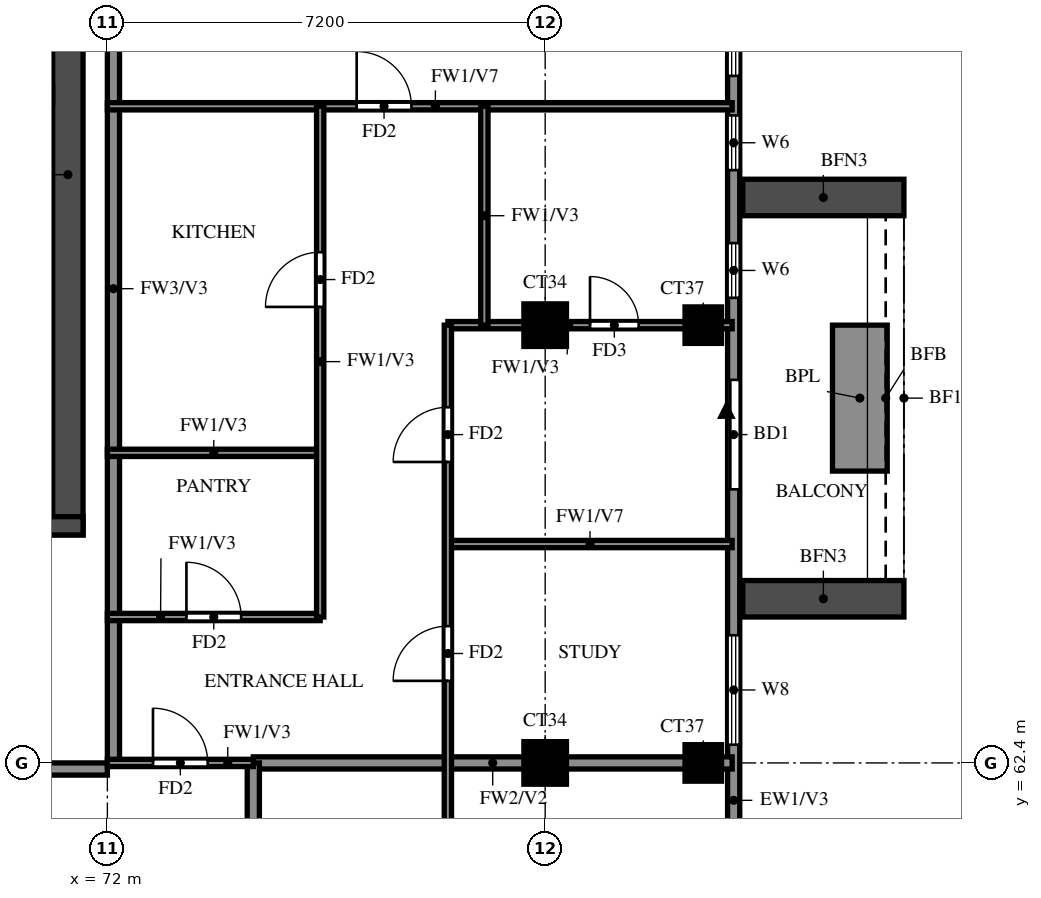
"""IFC4 building model, lengths in metres.
Left out: names, types, materials, properties, quantities, classifications, styles, units other than length and angle.
Written with IfcOpenShell. Run it as: python <this file> out.ifc"""

import sys

from ifc_helpers import new_model, si_unit, direction, frame, frame_2d, origin, origin_2d, place, context, subcontext, project, spatial, rectangle, extrude, source, transform, mapped, element, fill, save


model = new_model("IFC4")
c1 = context("Model", 3, precision=1e-05, world=origin(), true_north=direction((0.0, 1.0)))
c2 = subcontext(c1, "Body", "Model", "MODEL_VIEW")
j1 = project(units=[si_unit("LENGTHUNIT", "METRE"), si_unit("PLANEANGLEUNIT", "RADIAN")], contexts=[c1])
p1 = place(None, origin())
s1 = spatial("IfcSite", under=j1, at=p1, CompositionType="ELEMENT")
p2 = place(p1, origin())
s2 = spatial("IfcBuilding", under=s1, at=p2, CompositionType="ELEMENT")
p3 = place(p2, frame((0.0, 0.0, 253.5)))
s3 = spatial("IfcBuildingStorey", under=s2, at=p3, CompositionType="ELEMENT", Elevation=253.5)
m1 = source(origin(), c2, "Body", "SweptSolid", [
    extrude(rectangle(XDim=0.7, YDim=0.7, at=origin_2d()), origin(), (0.0, 0.0, 1.0), 3.22),
])
p4 = place(p3, frame((79.2, 62.4, 0.0), z_axis=(0.0, 0.0, 1.0), x_axis=(1.0, 0.0, 0.0)))
e1 = element("IfcColumn", 1, at=p4, inside=s3, PredefinedType="COLUMN", context=c2, shape_type="MappedRepresentation", body=[
    mapped(m1, transform((0.0, 0.0, 0.0))),
])
m2 = source(origin(), c2, "Body", "SweptSolid", [
    extrude(rectangle(XDim=0.6, YDim=0.6, at=origin_2d()), origin(), (0.0, 0.0, 1.0), 3.22),
])
p5 = place(p3, frame((81.8, 62.4, 0.0), z_axis=(0.0, 0.0, 1.0), x_axis=(1.0, 0.0, 0.0)))
e2 = element("IfcColumn", 2, at=p5, inside=s3, PredefinedType="COLUMN", context=c2, shape_type="MappedRepresentation", body=[
    mapped(m2, transform((0.0, 0.0, 0.0))),
])
p6 = place(p3, frame((79.2, 69.6, 0.0), z_axis=(0.0, 0.0, 1.0), x_axis=(1.0, 0.0, 0.0)))
e3 = element("IfcColumn", 3, at=p6, inside=s3, PredefinedType="COLUMN", context=c2, shape_type="MappedRepresentation", body=[
    mapped(m1, transform((0.0, 0.0, 0.0))),
])
p7 = place(p3, frame((81.8, 69.6, 0.0), z_axis=(0.0, 0.0, 1.0), x_axis=(1.0, 0.0, 0.0)))
e4 = element("IfcColumn", 4, at=p7, inside=s3, PredefinedType="COLUMN", context=c2, shape_type="MappedRepresentation", body=[
    mapped(m2, transform((0.0, 0.0, 0.0))),
])
p8 = place(p3, frame((71.35, 66.15, 0.0), z_axis=(0.0, 0.0, 1.0), x_axis=(0.0, 1.0, 0.0)))
e5 = element("IfcWall", 5, at=p8, inside=s3, PredefinedType="SHEAR", context=c2, shape_type="SweptSolid", body=[
    extrude(rectangle(XDim=11.85, YDim=0.5, at=frame_2d((5.925, 0.0))), origin(), (0.0, 0.0, 1.0), 3.22),
])
p9 = place(p3, frame((29.2, 66.3, 0.0), z_axis=(0.0, 0.0, 1.0), x_axis=(1.0, 0.0, 0.0)))
e6 = element("IfcWall", 6, at=p9, inside=s3, PredefinedType="SHEAR", context=c2, shape_type="SweptSolid", body=[
    extrude(rectangle(XDim=42.4, YDim=0.3, at=frame_2d((21.2, 0.0))), origin(), (0.0, 0.0, 1.0), 3.22),
])
p10 = place(p9, frame((1.425, 0.0, 0.0)))
e7 = element("IfcOpeningElement", 7, at=p10, cuts=e6, PredefinedType="OPENING", context=c2, shape_type="SweptSolid", body=[
    extrude(rectangle(XDim=1.1, YDim=2.1, at=frame_2d((0.55, 1.05))), frame((0.0, 0.16, 0.0), z_axis=(0.0, -1.0, 0.0), x_axis=(1.0, 0.0, 0.0)), (0.0, 0.0, 1.0), 0.32),
])
p11 = place(p9, frame((4.2, 0.0, 0.0)))
e8 = element("IfcOpeningElement", 8, at=p11, cuts=e6, PredefinedType="OPENING", context=c2, shape_type="SweptSolid", body=[
    extrude(rectangle(XDim=1.8, YDim=2.1, at=frame_2d((0.9, 1.05))), frame((0.0, 0.16, 0.0), z_axis=(0.0, -1.0, 0.0), x_axis=(1.0, 0.0, 0.0)), (0.0, 0.0, 1.0), 0.32),
])
p12 = place(p3, frame((82.3, 48.2, 0.0), z_axis=(0.0, 0.0, 1.0), x_axis=(0.0, 1.0, 0.0)))
e9 = element("IfcWall", 9, at=p12, inside=s3, PredefinedType="SOLIDWALL", context=c2, shape_type="SweptSolid", body=[
    extrude(rectangle(XDim=28.6, YDim=0.2, at=frame_2d((14.3, 0.0))), origin(), (0.0, 0.0, 1.0), 3.22),
])
p13 = place(p12, frame((4.3, 0.0, 0.0)))
e10 = element("IfcOpeningElement", 10, at=p13, cuts=e9, PredefinedType="OPENING", context=c2, shape_type="SweptSolid", body=[
    extrude(rectangle(XDim=1.8, YDim=2.4, at=frame_2d((0.9, 1.2))), frame((0.0, 0.11, 0.0), z_axis=(0.0, -1.0, 0.0), x_axis=(1.0, 0.0, 0.0)), (0.0, 0.0, 1.0), 0.22),
])
p14 = place(p12, frame((18.7, 0.0, 0.0)))
e11 = element("IfcOpeningElement", 11, at=p14, cuts=e9, PredefinedType="OPENING", context=c2, shape_type="SweptSolid", body=[
    extrude(rectangle(XDim=1.8, YDim=2.4, at=frame_2d((0.9, 1.2))), frame((0.0, 0.11, 0.0), z_axis=(0.0, -1.0, 0.0), x_axis=(1.0, 0.0, 0.0)), (0.0, 0.0, 1.0), 0.22),
])
p15 = place(p12, frame((0.6, 0.0, 0.6)))
e12 = element("IfcOpeningElement", 12, at=p15, cuts=e9, PredefinedType="OPENING", context=c2, shape_type="SweptSolid", body=[
    extrude(rectangle(XDim=1.2, YDim=2.4, at=frame_2d((0.6, 1.2))), frame((0.0, 0.11, 0.0), z_axis=(0.0, -1.0, 0.0), x_axis=(1.0, 0.0, 0.0)), (0.0, 0.0, 1.0), 0.22),
])
p16 = place(p12, frame((7.3, 0.0, 0.6)))
e13 = element("IfcOpeningElement", 13, at=p16, cuts=e9, PredefinedType="OPENING", context=c2, shape_type="SweptSolid", body=[
    extrude(rectangle(XDim=1.2, YDim=2.4, at=frame_2d((0.6, 1.2))), frame((0.0, 0.11, 0.0), z_axis=(0.0, -1.0, 0.0), x_axis=(1.0, 0.0, 0.0)), (0.0, 0.0, 1.0), 0.22),
])
p17 = place(p12, frame((10.6, 0.0, 0.6)))
e14 = element("IfcOpeningElement", 14, at=p17, cuts=e9, PredefinedType="OPENING", context=c2, shape_type="SweptSolid", body=[
    extrude(rectangle(XDim=2.4, YDim=2.4, at=frame_2d((1.2, 1.2))), frame((0.0, 0.11, 0.0), z_axis=(0.0, -1.0, 0.0), x_axis=(1.0, 0.0, 0.0)), (0.0, 0.0, 1.0), 0.22),
])
p18 = place(p12, frame((14.5, 0.0, 0.6)))
e15 = element("IfcOpeningElement", 15, at=p18, cuts=e9, PredefinedType="OPENING", context=c2, shape_type="SweptSolid", body=[
    extrude(rectangle(XDim=1.8, YDim=2.4, at=frame_2d((0.9, 1.2))), frame((0.0, 0.11, 0.0), z_axis=(0.0, -1.0, 0.0), x_axis=(1.0, 0.0, 0.0)), (0.0, 0.0, 1.0), 0.22),
])
p19 = place(p12, frame((21.85, 0.0, 1.5)))
e16 = element("IfcOpeningElement", 16, at=p19, cuts=e9, PredefinedType="OPENING", context=c2, shape_type="SweptSolid", body=[
    extrude(rectangle(XDim=0.9, YDim=0.9, at=frame_2d((0.45, 0.45))), frame((0.0, 0.11, 0.0), z_axis=(0.0, -1.0, 0.0), x_axis=(1.0, 0.0, 0.0)), (0.0, 0.0, 1.0), 0.22),
])
p20 = place(p12, frame((23.95, 0.0, 1.5)))
e17 = element("IfcOpeningElement", 17, at=p20, cuts=e9, PredefinedType="OPENING", context=c2, shape_type="SweptSolid", body=[
    extrude(rectangle(XDim=0.9, YDim=0.9, at=frame_2d((0.45, 0.45))), frame((0.0, 0.11, 0.0), z_axis=(0.0, -1.0, 0.0), x_axis=(1.0, 0.0, 0.0)), (0.0, 0.0, 1.0), 0.22),
])
p21 = place(p12, frame((25.5, 0.0, 0.6)))
e18 = element("IfcOpeningElement", 18, at=p21, cuts=e9, PredefinedType="OPENING", context=c2, shape_type="SweptSolid", body=[
    extrude(rectangle(XDim=2.4, YDim=2.4, at=frame_2d((1.2, 1.2))), frame((0.0, 0.11, 0.0), z_axis=(0.0, -1.0, 0.0), x_axis=(1.0, 0.0, 0.0)), (0.0, 0.0, 1.0), 0.22),
])
for number, where, z_axis, x_axis in (
    (19, (82.45, 65.1, 0.0), (0.0, 0.0, 1.0), (1.0, 0.0, 0.0)),
    (20, (82.45, 71.7, 0.0), (0.0, 0.0, 1.0), (1.0, 0.0, 0.0)),
):
    element("IfcWall", number, at=place(p3, frame(where, z_axis=z_axis, x_axis=x_axis)), inside=s3, PredefinedType="SOLIDWALL", context=c2, shape_type="SweptSolid", body=[
        extrude(rectangle(XDim=2.65, YDim=0.6, at=frame_2d((1.325, 0.0))), origin(), (0.0, 0.0, 1.0), 2.85),
    ])
p22 = place(p3, frame((84.375, 67.2, 0.0), z_axis=(0.0, 0.0, 1.0), x_axis=(0.0, 1.0, 0.0)))
e21 = element("IfcWall", 21, at=p22, inside=s3, PredefinedType="SOLIDWALL", context=c2, shape_type="SweptSolid", body=[
    extrude(rectangle(XDim=2.4, YDim=0.9, at=frame_2d((1.2, 0.0))), origin(), (0.0, 0.0, 1.0), 0.9),
])
p23 = place(p3, frame((67.2, 62.3, 0.0), z_axis=(0.0, 0.0, 1.0), x_axis=(1.0, 0.0, 0.0)))
e22 = element("IfcWall", 22, at=p23, inside=s3, PredefinedType="SOLIDWALL", context=c2, shape_type="SweptSolid", body=[
    extrude(rectangle(XDim=4.8, YDim=0.2, at=frame_2d((2.4, 0.0))), origin(), (0.0, 0.0, 1.0), 3.22),
])
p24 = place(p3, frame((72.1, 62.4, 0.0), z_axis=(0.0, 0.0, 1.0), x_axis=(0.0, 1.0, 0.0)))
e23 = element("IfcWall", 23, at=p24, inside=s3, PredefinedType="SOLIDWALL", context=c2, shape_type="SweptSolid", body=[
    extrude(rectangle(XDim=15.6, YDim=0.2, at=frame_2d((7.8, 0.0))), origin(), (0.0, 0.0, 1.0), 3.22),
])
p25 = place(p3, frame((74.4, 62.4, 0.0), z_axis=(0.0, 0.0, 1.0), x_axis=(1.0, 0.0, 0.0)))
e24 = element("IfcWall", 24, at=p25, inside=s3, PredefinedType="SOLIDWALL", context=c2, shape_type="SweptSolid", body=[
    extrude(rectangle(XDim=7.875, YDim=0.2, at=frame_2d((3.938, 0.0))), origin(), (0.0, 0.0, 1.0), 3.22),
])
p26 = place(p3, frame((74.4, 60.0, 0.0), z_axis=(0.0, 0.0, 1.0), x_axis=(0.0, 1.0, 0.0)))
e25 = element("IfcWall", 25, at=p26, inside=s3, PredefinedType="SOLIDWALL", context=c2, shape_type="SweptSolid", body=[
    extrude(rectangle(XDim=2.4, YDim=0.2, at=frame_2d((1.2, 0.0))), origin(), (0.0, 0.0, 1.0), 3.22),
])
p27 = place(p3, frame((72.0, 62.4, 0.0), z_axis=(0.0, 0.0, 1.0), x_axis=(1.0, 0.0, 0.0)))
e26 = element("IfcWall", 26, at=p27, inside=s3, PredefinedType="PARTITIONING", context=c2, shape_type="SweptSolid", body=[
    extrude(rectangle(XDim=2.4, YDim=0.12, at=frame_2d((1.2, 0.0))), origin(), (0.0, 0.0, 1.0), 3.22),
])
p28 = place(p27, frame((0.75, 0.0, 0.0)))
e27 = element("IfcOpeningElement", 27, at=p28, cuts=e26, PredefinedType="OPENING", context=c2, shape_type="SweptSolid", body=[
    extrude(rectangle(XDim=0.9, YDim=2.1, at=frame_2d((0.45, 1.05))), frame((0.0, 0.07, 0.0), z_axis=(0.0, -1.0, 0.0), x_axis=(1.0, 0.0, 0.0)), (0.0, 0.0, 1.0), 0.14),
])
p29 = place(p3, frame((72.0, 64.8, 0.0), z_axis=(0.0, 0.0, 1.0), x_axis=(1.0, 0.0, 0.0)))
e28 = element("IfcWall", 28, at=p29, inside=s3, PredefinedType="PARTITIONING", context=c2, shape_type="SweptSolid", body=[
    extrude(rectangle(XDim=3.5, YDim=0.12, at=frame_2d((1.75, 0.0))), origin(), (0.0, 0.0, 1.0), 3.22),
])
p30 = place(p29, frame((1.3, 0.0, 0.0)))
e29 = element("IfcOpeningElement", 29, at=p30, cuts=e28, PredefinedType="OPENING", context=c2, shape_type="SweptSolid", body=[
    extrude(rectangle(XDim=0.9, YDim=2.1, at=frame_2d((0.45, 1.05))), frame((0.0, 0.07, 0.0), z_axis=(0.0, -1.0, 0.0), x_axis=(1.0, 0.0, 0.0)), (0.0, 0.0, 1.0), 0.14),
])
p31 = place(p3, frame((77.6, 66.0, 0.0), z_axis=(0.0, 0.0, 1.0), x_axis=(1.0, 0.0, 0.0)))
e30 = element("IfcWall", 30, at=p31, inside=s3, PredefinedType="PARTITIONING", context=c2, shape_type="SweptSolid", body=[
    extrude(rectangle(XDim=4.675, YDim=0.12, at=frame_2d((2.337, 0.0))), origin(), (0.0, 0.0, 1.0), 2.32),
])
p32 = place(p3, frame((72.0, 67.5, 0.0), z_axis=(0.0, 0.0, 1.0), x_axis=(1.0, 0.0, 0.0)))
e31 = element("IfcWall", 31, at=p32, inside=s3, PredefinedType="PARTITIONING", context=c2, shape_type="SweptSolid", body=[
    extrude(rectangle(XDim=3.5, YDim=0.12, at=frame_2d((1.75, 0.0))), origin(), (0.0, 0.0, 1.0), 3.22),
])
p33 = place(p3, frame((77.6, 69.6, 0.0), z_axis=(0.0, 0.0, 1.0), x_axis=(1.0, 0.0, 0.0)))
e32 = element("IfcWall", 32, at=p33, inside=s3, PredefinedType="PARTITIONING", context=c2, shape_type="SweptSolid", body=[
    extrude(rectangle(XDim=4.675, YDim=0.12, at=frame_2d((2.337, 0.0))), origin(), (0.0, 0.0, 1.0), 3.22),
])
p34 = place(p33, frame((2.337, 0.0, 0.0)))
e33 = element("IfcOpeningElement", 33, at=p34, cuts=e32, PredefinedType="OPENING", context=c2, shape_type="SweptSolid", body=[
    extrude(rectangle(XDim=0.8, YDim=2.1, at=frame_2d((0.4, 1.05))), frame((0.0, 0.07, 0.0), z_axis=(0.0, -1.0, 0.0), x_axis=(1.0, 0.0, 0.0)), (0.0, 0.0, 1.0), 0.14),
])
p35 = place(p3, frame((72.0, 73.2, 0.0), z_axis=(0.0, 0.0, 1.0), x_axis=(1.0, 0.0, 0.0)))
e34 = element("IfcWall", 34, at=p35, inside=s3, PredefinedType="PARTITIONING", context=c2, shape_type="SweptSolid", body=[
    extrude(rectangle(XDim=10.275, YDim=0.12, at=frame_2d((5.137, 0.0))), origin(), (0.0, 0.0, 1.0), 2.32),
])
p36 = place(p35, frame((4.1, 0.0, 0.0)))
e35 = element("IfcOpeningElement", 35, at=p36, cuts=e34, PredefinedType="OPENING", context=c2, shape_type="SweptSolid", body=[
    extrude(rectangle(XDim=0.9, YDim=2.1, at=frame_2d((0.45, 1.05))), frame((0.0, 0.07, 0.0), z_axis=(0.0, -1.0, 0.0), x_axis=(1.0, 0.0, 0.0)), (0.0, 0.0, 1.0), 0.14),
])
p37 = place(p3, frame((75.5, 64.8, 0.0), z_axis=(0.0, 0.0, 1.0), x_axis=(0.0, 1.0, 0.0)))
e36 = element("IfcWall", 36, at=p37, inside=s3, PredefinedType="PARTITIONING", context=c2, shape_type="SweptSolid", body=[
    extrude(rectangle(XDim=8.4, YDim=0.12, at=frame_2d((4.2, 0.0))), origin(), (0.0, 0.0, 1.0), 3.22),
])
p38 = place(p37, frame((5.1, 0.0, 0.0)))
e37 = element("IfcOpeningElement", 37, at=p38, cuts=e36, PredefinedType="OPENING", context=c2, shape_type="SweptSolid", body=[
    extrude(rectangle(XDim=0.9, YDim=2.1, at=frame_2d((0.45, 1.05))), frame((0.0, 0.07, 0.0), z_axis=(0.0, -1.0, 0.0), x_axis=(1.0, 0.0, 0.0)), (0.0, 0.0, 1.0), 0.14),
])
p39 = place(p3, frame((77.6, 48.125, 0.0), z_axis=(0.0, 0.0, 1.0), x_axis=(0.0, 1.0, 0.0)))
e38 = element("IfcWall", 38, at=p39, inside=s3, PredefinedType="PARTITIONING", context=c2, shape_type="SweptSolid", body=[
    extrude(rectangle(XDim=21.475, YDim=0.12, at=frame_2d((10.738, 0.0))), origin(), (0.0, 0.0, 1.0), 3.22),
])
p40 = place(p39, frame((1.288, 0.0, 0.0)))
e39 = element("IfcOpeningElement", 39, at=p40, cuts=e38, PredefinedType="OPENING", context=c2, shape_type="SweptSolid", body=[
    extrude(rectangle(XDim=0.9, YDim=2.1, at=frame_2d((0.45, 1.05))), frame((0.0, 0.07, 0.0), z_axis=(0.0, -1.0, 0.0), x_axis=(1.0, 0.0, 0.0)), (0.0, 0.0, 1.0), 0.14),
])
p41 = place(p39, frame((4.825, 0.0, 0.0)))
e40 = element("IfcOpeningElement", 40, at=p41, cuts=e38, PredefinedType="OPENING", context=c2, shape_type="SweptSolid", body=[
    extrude(rectangle(XDim=0.9, YDim=2.1, at=frame_2d((0.45, 1.05))), frame((0.0, 0.07, 0.0), z_axis=(0.0, -1.0, 0.0), x_axis=(1.0, 0.0, 0.0)), (0.0, 0.0, 1.0), 0.14),
])
p42 = place(p39, frame((9.925, 0.0, 0.0)))
e41 = element("IfcOpeningElement", 41, at=p42, cuts=e38, PredefinedType="OPENING", context=c2, shape_type="SweptSolid", body=[
    extrude(rectangle(XDim=1.5, YDim=2.1, at=frame_2d((0.75, 1.05))), frame((0.0, 0.07, 0.0), z_axis=(0.0, -1.0, 0.0), x_axis=(1.0, 0.0, 0.0)), (0.0, 0.0, 1.0), 0.14),
])
p43 = place(p39, frame((15.625, 0.0, 0.0)))
e42 = element("IfcOpeningElement", 42, at=p43, cuts=e38, PredefinedType="OPENING", context=c2, shape_type="SweptSolid", body=[
    extrude(rectangle(XDim=0.9, YDim=2.1, at=frame_2d((0.45, 1.05))), frame((0.0, 0.07, 0.0), z_axis=(0.0, -1.0, 0.0), x_axis=(1.0, 0.0, 0.0)), (0.0, 0.0, 1.0), 0.14),
])
p44 = place(p39, frame((19.225, 0.0, 0.0)))
e43 = element("IfcOpeningElement", 43, at=p44, cuts=e38, PredefinedType="OPENING", context=c2, shape_type="SweptSolid", body=[
    extrude(rectangle(XDim=0.9, YDim=2.1, at=frame_2d((0.45, 1.05))), frame((0.0, 0.07, 0.0), z_axis=(0.0, -1.0, 0.0), x_axis=(1.0, 0.0, 0.0)), (0.0, 0.0, 1.0), 0.14),
])
p45 = place(p3, frame((78.2, 69.6, 0.0), z_axis=(0.0, 0.0, 1.0), x_axis=(0.0, 1.0, 0.0)))
e44 = element("IfcWall", 44, at=p45, inside=s3, PredefinedType="PARTITIONING", context=c2, shape_type="SweptSolid", body=[
    extrude(rectangle(XDim=3.6, YDim=0.12, at=frame_2d((1.8, 0.0))), origin(), (0.0, 0.0, 1.0), 3.22),
])
p46 = place(p14, origin())
e45 = element("IfcDoor", 45, at=p46, inside=s3, OperationType="DOUBLE_DOOR_SLIDING", PredefinedType="DOOR", context=c2, shape_type="SweptSolid", body=[
    extrude(rectangle(XDim=1.8, YDim=2.4, at=frame_2d((0.9, 1.2))), frame((0.0, 0.025, 0.0), z_axis=(0.0, -1.0, 0.0), x_axis=(1.0, 0.0, 0.0)), (0.0, 0.0, 1.0), 0.05),
])
fill(e11, e45)
p47 = place(p18, origin())
e46 = element("IfcWindow", 46, at=p47, inside=s3, PartitioningType="DOUBLE_PANEL_VERTICAL", PredefinedType="WINDOW", context=c2, shape_type="SweptSolid", body=[
    extrude(rectangle(XDim=1.8, YDim=2.4, at=frame_2d((0.9, 1.2))), frame((0.0, 0.03, 0.0), z_axis=(0.0, -1.0, 0.0), x_axis=(1.0, 0.0, 0.0)), (0.0, 0.0, 1.0), 0.06),
])
fill(e15, e46)
p48 = place(p19, origin())
e47 = element("IfcWindow", 47, at=p48, inside=s3, PartitioningType="SINGLE_PANEL", PredefinedType="WINDOW", context=c2, shape_type="SweptSolid", body=[
    extrude(rectangle(XDim=0.9, YDim=0.9, at=frame_2d((0.45, 0.45))), frame((0.0, 0.03, 0.0), z_axis=(0.0, -1.0, 0.0), x_axis=(1.0, 0.0, 0.0)), (0.0, 0.0, 1.0), 0.06),
])
fill(e16, e47)
p49 = place(p20, origin())
e48 = element("IfcWindow", 48, at=p49, inside=s3, PartitioningType="SINGLE_PANEL", PredefinedType="WINDOW", context=c2, shape_type="SweptSolid", body=[
    extrude(rectangle(XDim=0.9, YDim=0.9, at=frame_2d((0.45, 0.45))), frame((0.0, 0.03, 0.0), z_axis=(0.0, -1.0, 0.0), x_axis=(1.0, 0.0, 0.0)), (0.0, 0.0, 1.0), 0.06),
])
fill(e17, e48)
p50 = place(p21, origin())
e49 = element("IfcWindow", 49, at=p50, inside=s3, PartitioningType="DOUBLE_PANEL_VERTICAL", PredefinedType="WINDOW", context=c2, shape_type="SweptSolid", body=[
    extrude(rectangle(XDim=2.4, YDim=2.4, at=frame_2d((1.2, 1.2))), frame((0.0, 0.03, 0.0), z_axis=(0.0, -1.0, 0.0), x_axis=(1.0, 0.0, 0.0)), (0.0, 0.0, 1.0), 0.06),
])
fill(e18, e49)
p51 = place(p28, origin())
e50 = element("IfcDoor", 50, at=p51, inside=s3, OperationType="SINGLE_SWING_RIGHT", PredefinedType="DOOR", context=c2, shape_type="SweptSolid", body=[
    extrude(rectangle(XDim=0.9, YDim=2.1, at=frame_2d((0.45, 1.05))), frame((0.0, 0.025, 0.0), z_axis=(0.0, -1.0, 0.0), x_axis=(1.0, 0.0, 0.0)), (0.0, 0.0, 1.0), 0.05),
])
fill(e27, e50)
p52 = place(p43, origin())
e51 = element("IfcDoor", 51, at=p52, inside=s3, OperationType="SINGLE_SWING_LEFT", PredefinedType="DOOR", context=c2, shape_type="SweptSolid", body=[
    extrude(rectangle(XDim=0.9, YDim=2.1, at=frame_2d((0.45, 1.05))), frame((0.0, 0.025, 0.0), z_axis=(0.0, -1.0, 0.0), x_axis=(1.0, 0.0, 0.0)), (0.0, 0.0, 1.0), 0.05),
])
fill(e42, e51)
p53 = place(p44, origin())
e52 = element("IfcDoor", 52, at=p53, inside=s3, OperationType="SINGLE_SWING_RIGHT", PredefinedType="DOOR", context=c2, shape_type="SweptSolid", body=[
    extrude(rectangle(XDim=0.9, YDim=2.1, at=frame_2d((0.45, 1.05))), frame((0.0, 0.025, 0.0), z_axis=(0.0, -1.0, 0.0), x_axis=(1.0, 0.0, 0.0)), (0.0, 0.0, 1.0), 0.05),
])
fill(e43, e52)
p54 = place(p34, origin())
e53 = element("IfcDoor", 53, at=p54, inside=s3, OperationType="SINGLE_SWING_RIGHT", PredefinedType="DOOR", context=c2, shape_type="SweptSolid", body=[
    extrude(rectangle(XDim=0.8, YDim=2.1, at=frame_2d((0.4, 1.05))), frame((0.0, 0.025, 0.0), z_axis=(0.0, -1.0, 0.0), x_axis=(1.0, 0.0, 0.0)), (0.0, 0.0, 1.0), 0.05),
])
fill(e33, e53)
p55 = place(p36, origin())
e54 = element("IfcDoor", 54, at=p55, inside=s3, OperationType="SINGLE_SWING_LEFT", PredefinedType="DOOR", context=c2, shape_type="SweptSolid", body=[
    extrude(rectangle(XDim=0.9, YDim=2.1, at=frame_2d((0.45, 1.05))), frame((0.0, 0.025, 0.0), z_axis=(0.0, -1.0, 0.0), x_axis=(1.0, 0.0, 0.0)), (0.0, 0.0, 1.0), 0.05),
])
fill(e35, e54)
p56 = place(p30, origin())
e55 = element("IfcDoor", 55, at=p56, inside=s3, OperationType="SINGLE_SWING_RIGHT", PredefinedType="DOOR", context=c2, shape_type="SweptSolid", body=[
    extrude(rectangle(XDim=0.9, YDim=2.1, at=frame_2d((0.45, 1.05))), frame((0.0, 0.025, 0.0), z_axis=(0.0, -1.0, 0.0), x_axis=(1.0, 0.0, 0.0)), (0.0, 0.0, 1.0), 0.05),
])
fill(e29, e55)
p57 = place(p38, origin())
e56 = element("IfcDoor", 56, at=p57, inside=s3, OperationType="SINGLE_SWING_LEFT", PredefinedType="DOOR", context=c2, shape_type="SweptSolid", body=[
    extrude(rectangle(XDim=0.9, YDim=2.1, at=frame_2d((0.45, 1.05))), frame((0.0, 0.025, 0.0), z_axis=(0.0, -1.0, 0.0), x_axis=(1.0, 0.0, 0.0)), (0.0, 0.0, 1.0), 0.05),
])
fill(e37, e56)
save(model, sys.argv[1])
